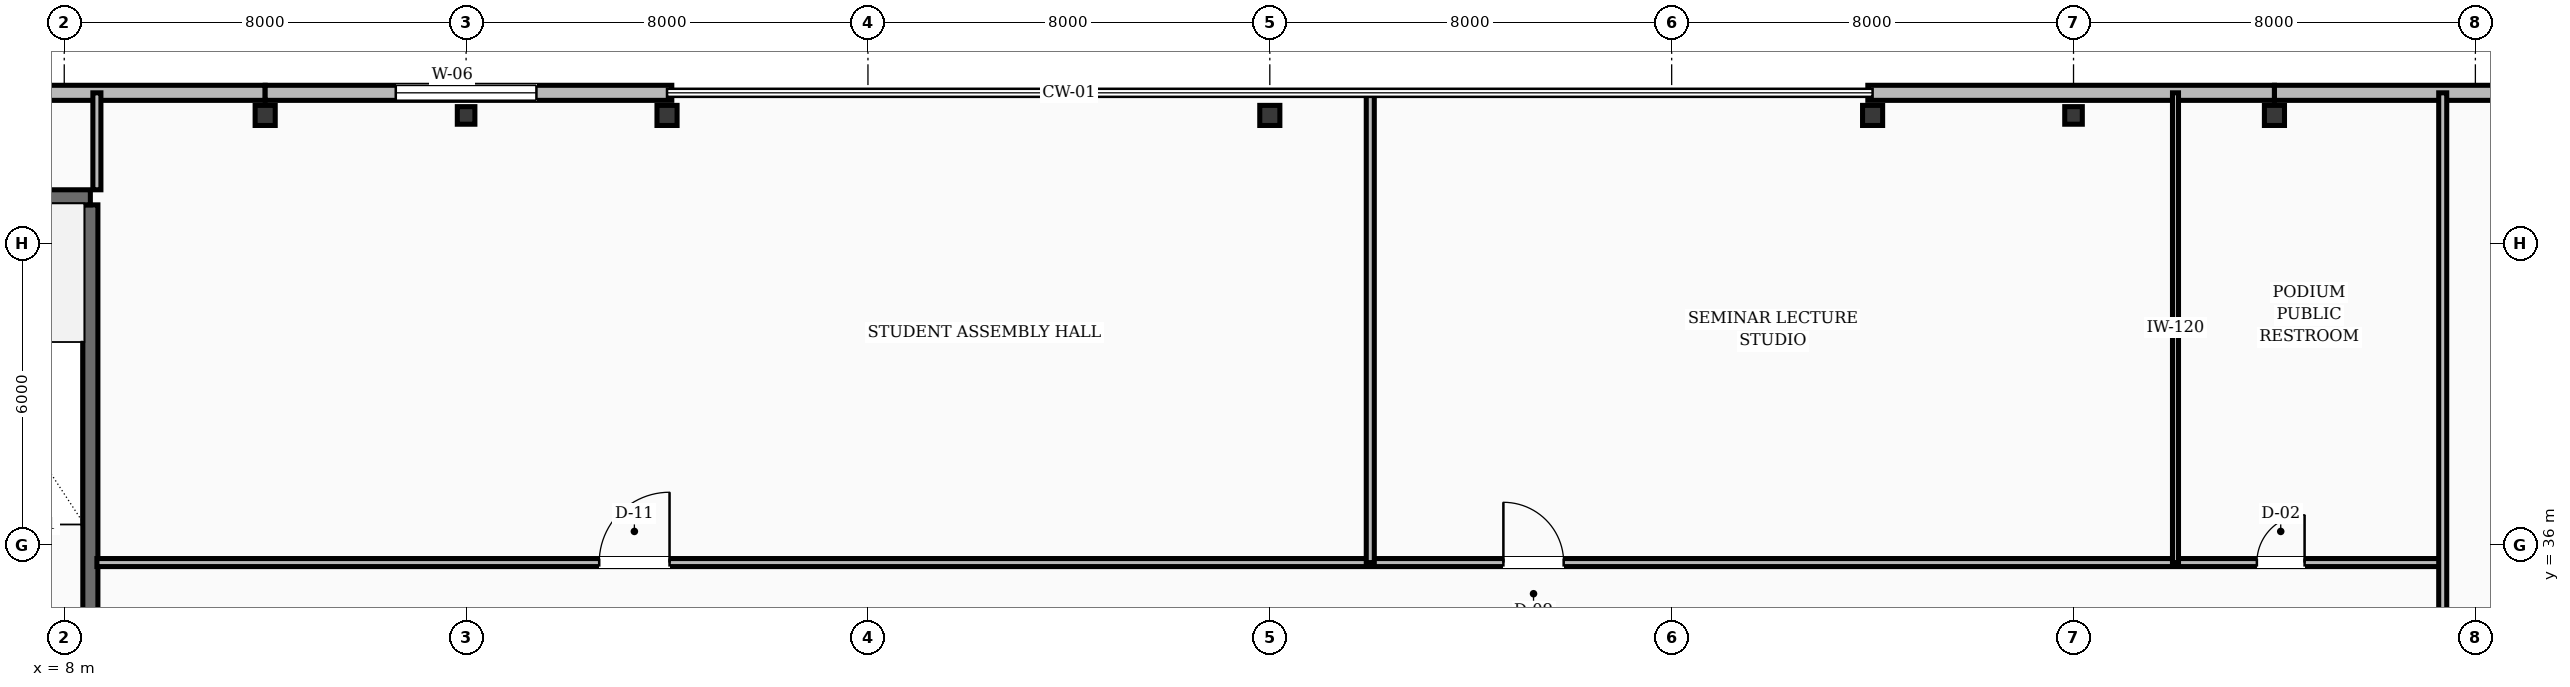
"""IFC4 building model, lengths in metres.
Left out: names, types, materials, properties, quantities, classifications, styles, units other than length and angle.
Written with IfcOpenShell. Run it as: python <this file> out.ifc"""

import sys

from ifc_helpers import new_model, si_unit, direction, frame, frame_2d, origin, origin_2d, place, context, subcontext, project, spatial, rectangle, hollow_rectangle, i_section, extrude, element, fill, save


model = new_model("IFC4")
c1 = context("Model", 3, precision=1e-05, world=origin(), true_north=direction((0.0, 1.0)))
c2 = subcontext(c1, "Body", "Model", "MODEL_VIEW")
j1 = project(units=[si_unit("LENGTHUNIT", "METRE"), si_unit("PLANEANGLEUNIT", "RADIAN")], contexts=[c1])
p1 = place(None, origin())
s1 = spatial("IfcSite", under=j1, at=p1, CompositionType="ELEMENT")
p2 = place(p1, origin())
s2 = spatial("IfcBuilding", under=s1, at=p2, CompositionType="ELEMENT")
p3 = place(p2, frame((0.0, 0.0, 5.2)))
s3 = spatial("IfcBuildingStorey", under=s2, at=p3, CompositionType="ELEMENT", Elevation=5.2)
p4 = place(p3, frame((8.52, 34.43, 0.0), z_axis=(0.0, 0.0, 1.0), x_axis=(0.0, 1.0, 0.0)))
e1 = element("IfcWall", 1, at=p4, inside=s3, PredefinedType="SHEAR", context=c2, shape_type="SweptSolid", body=[
    extrude(rectangle(XDim=8.34, YDim=0.3, at=frame_2d((4.17, 0.0))), origin(), (0.0, 0.0, 1.0), 4.8),
])
p5 = place(p3, frame((4.08, 42.92, 0.0), z_axis=(0.0, 0.0, 1.0), x_axis=(1.0, 0.0, 0.0)))
e2 = element("IfcWall", 2, at=p5, inside=s3, PredefinedType="SHEAR", context=c2, shape_type="SweptSolid", body=[
    extrude(rectangle(XDim=4.44, YDim=0.3, at=frame_2d((2.22, 0.0))), origin(), (0.0, 0.0, 1.0), 4.8),
])
for number, where, z_axis, x_axis in (
    (3, (12.0, 44.55, 0.0), (0.0, 0.0, 1.0), (1.0, 0.0, 0.0)),
    (4, (20.0, 44.55, 0.0), (0.0, 0.0, 1.0), (1.0, 0.0, 0.0)),
    (5, (32.0, 44.55, 0.0), (0.0, 0.0, 1.0), (1.0, 0.0, 0.0)),
    (6, (44.0, 44.55, 0.0), (0.0, 0.0, 1.0), (1.0, 0.0, 0.0)),
    (7, (52.0, 44.55, 0.0), (0.0, 0.0, 1.0), (1.0, 0.0, 0.0)),
):
    element("IfcColumn", number, at=place(p3, frame(where, z_axis=z_axis, x_axis=x_axis)), inside=s3, PredefinedType="COLUMN", context=c2, shape_type="SweptSolid", body=[
        extrude(i_section(OverallWidth=0.4, OverallDepth=0.4, WebThickness=0.013, FlangeThickness=0.021, FilletRadius=0.018, at=origin_2d()), origin(), (0.0, 0.0, 1.0), 4.8),
    ])
for number, where, z_axis, x_axis in (
    (8, (16.0, 44.55, 0.0), (0.0, 0.0, 1.0), (1.0, 0.0, 0.0)),
    (9, (48.0, 44.55, 0.0), (0.0, 0.0, 1.0), (1.0, 0.0, 0.0)),
):
    element("IfcColumn", number, at=place(p3, frame(where, z_axis=z_axis, x_axis=x_axis)), inside=s3, PredefinedType="PILASTER", context=c2, shape_type="SweptSolid", body=[
        extrude(hollow_rectangle(XDim=0.35, YDim=0.35, WallThickness=0.016, at=origin_2d()), origin(), (0.0, 0.0, 1.0), 4.8),
    ])
p6 = place(p3, frame((12.0, 45.0, 0.0), z_axis=(0.0, 0.0, 1.0), x_axis=(-1.0, 0.0, 0.0)))
e10 = element("IfcWall", 10, at=p6, inside=s3, PredefinedType="STANDARD", context=c2, shape_type="SweptSolid", body=[
    extrude(rectangle(XDim=8.0, YDim=0.3, at=frame_2d((4.0, 0.0))), origin(), (0.0, 0.0, 1.0), 3.57),
])
p7 = place(p3, frame((20.095, 45.0, 0.0), z_axis=(0.0, 0.0, 1.0), x_axis=(-1.0, 0.0, 0.0)))
e11 = element("IfcWall", 11, at=p7, inside=s3, PredefinedType="STANDARD", context=c2, shape_type="SweptSolid", body=[
    extrude(rectangle(XDim=8.095, YDim=0.3, at=frame_2d((4.047, 0.0))), origin(), (0.0, 0.0, 1.0), 3.57),
])
p8 = place(p7, frame((2.695, 0.0, 0.85)))
e12 = element("IfcOpeningElement", 12, at=p8, cuts=e11, PredefinedType="OPENING", context=c2, shape_type="SweptSolid", body=[
    extrude(rectangle(XDim=2.8, YDim=2.3, at=frame_2d((1.4, 1.15))), frame((0.0, 0.16, 0.0), z_axis=(0.0, -1.0, 0.0), x_axis=(1.0, 0.0, 0.0)), (0.0, 0.0, 1.0), 0.32),
])
p9 = place(p3, frame((52.0, 45.0, 0.0), z_axis=(0.0, 0.0, 1.0), x_axis=(-1.0, 0.0, 0.0)))
e13 = element("IfcWall", 13, at=p9, inside=s3, PredefinedType="STANDARD", context=c2, shape_type="SweptSolid", body=[
    extrude(rectangle(XDim=8.095, YDim=0.3, at=frame_2d((4.047, 0.0))), origin(), (0.0, 0.0, 1.0), 3.57),
])
p10 = place(p3, frame((60.0, 45.0, 0.0), z_axis=(0.0, 0.0, 1.0), x_axis=(-1.0, 0.0, 0.0)))
e14 = element("IfcWall", 14, at=p10, inside=s3, PredefinedType="STANDARD", context=c2, shape_type="SweptSolid", body=[
    extrude(rectangle(XDim=8.0, YDim=0.3, at=frame_2d((4.0, 0.0))), origin(), (0.0, 0.0, 1.0), 3.57),
])
p11 = place(p3, frame((8.65, 35.65, 0.0), z_axis=(0.0, 0.0, 1.0), x_axis=(1.0, 0.0, 0.0)))
e15 = element("IfcWall", 15, at=p11, inside=s3, PredefinedType="SOLIDWALL", context=c2, shape_type="SweptSolid", body=[
    extrude(rectangle(XDim=46.7, YDim=0.16, at=frame_2d((23.35, 0.0))), origin(), (0.0, 0.0, 1.0), 3.52),
])
p12 = place(p11, frame((10.0, 0.0, 0.0)))
e16 = element("IfcOpeningElement", 16, at=p12, cuts=e15, PredefinedType="OPENING", context=c2, shape_type="SweptSolid", body=[
    extrude(rectangle(XDim=1.4, YDim=2.15, at=frame_2d((0.7, 1.075))), frame((0.0, 0.09, 0.0), z_axis=(0.0, -1.0, 0.0), x_axis=(1.0, 0.0, 0.0)), (0.0, 0.0, 1.0), 0.18),
])
p13 = place(p11, frame((28.0, 0.0, 0.0)))
e17 = element("IfcOpeningElement", 17, at=p13, cuts=e15, PredefinedType="OPENING", context=c2, shape_type="SweptSolid", body=[
    extrude(rectangle(XDim=1.2, YDim=2.1, at=frame_2d((0.6, 1.05))), frame((0.0, 0.09, 0.0), z_axis=(0.0, -1.0, 0.0), x_axis=(1.0, 0.0, 0.0)), (0.0, 0.0, 1.0), 0.18),
])
p14 = place(p11, frame((43.0, 0.0, 0.0)))
e18 = element("IfcOpeningElement", 18, at=p14, cuts=e15, PredefinedType="OPENING", context=c2, shape_type="SweptSolid", body=[
    extrude(rectangle(XDim=0.95, YDim=2.1, at=frame_2d((0.475, 1.05))), frame((0.0, 0.09, 0.0), z_axis=(0.0, -1.0, 0.0), x_axis=(1.0, 0.0, 0.0)), (0.0, 0.0, 1.0), 0.18),
])
p15 = place(p3, frame((55.35, 15.55, 0.0), z_axis=(0.0, 0.0, 1.0), x_axis=(0.0, 1.0, 0.0)))
e19 = element("IfcWall", 19, at=p15, inside=s3, PredefinedType="SOLIDWALL", context=c2, shape_type="SweptSolid", body=[
    extrude(rectangle(XDim=29.45, YDim=0.16, at=frame_2d((14.725, 0.0))), origin(), (0.0, 0.0, 1.0), 3.52),
])
p16 = place(p15, frame((8.0, 0.0, 0.0)))
e20 = element("IfcOpeningElement", 20, at=p16, cuts=e19, PredefinedType="OPENING", context=c2, shape_type="SweptSolid", body=[
    extrude(rectangle(XDim=1.4, YDim=2.15, at=frame_2d((0.7, 1.075))), frame((0.0, 0.09, 0.0), z_axis=(0.0, -1.0, 0.0), x_axis=(1.0, 0.0, 0.0)), (0.0, 0.0, 1.0), 0.18),
])
p17 = place(p3, frame((8.65, 43.07, 0.0), z_axis=(0.0, 0.0, 1.0), x_axis=(0.0, 1.0, 0.0)))
e21 = element("IfcWall", 21, at=p17, inside=s3, PredefinedType="SOLIDWALL", context=c2, shape_type="SweptSolid", body=[
    extrude(rectangle(XDim=1.93, YDim=0.16, at=frame_2d((0.965, 0.0))), origin(), (0.0, 0.0, 1.0), 3.52),
])
p18 = place(p3, frame((34.0, 35.65, 0.0), z_axis=(0.0, 0.0, 1.0), x_axis=(0.0, 1.0, 0.0)))
e22 = element("IfcWall", 22, at=p18, inside=s3, PredefinedType="SOLIDWALL", context=c2, shape_type="SweptSolid", body=[
    extrude(rectangle(XDim=9.35, YDim=0.16, at=frame_2d((4.675, 0.0))), origin(), (0.0, 0.0, 1.0), 3.52),
])
p19 = place(p3, frame((50.03, 35.65, 0.0), z_axis=(0.0, 0.0, 1.0), x_axis=(0.0, 1.0, 0.0)))
e23 = element("IfcWall", 23, at=p19, inside=s3, PredefinedType="PARTITIONING", context=c2, shape_type="SweptSolid", body=[
    extrude(rectangle(XDim=9.35, YDim=0.12, at=frame_2d((4.675, 0.0))), origin(), (0.0, 0.0, 1.0), 3.52),
])
p20 = place(p8, origin())
e24 = element("IfcWindow", 24, at=p20, inside=s3, PartitioningType="SINGLE_PANEL", PredefinedType="WINDOW", context=c2, shape_type="SweptSolid", body=[
    extrude(rectangle(XDim=2.8, YDim=2.3, at=frame_2d((1.4, 1.15))), frame((0.0, 0.03, 0.0), z_axis=(0.0, -1.0, 0.0), x_axis=(1.0, 0.0, 0.0)), (0.0, 0.0, 1.0), 0.06),
])
fill(e12, e24)
p21 = place(p12, origin())
e25 = element("IfcDoor", 25, at=p21, inside=s3, OperationType="SINGLE_SWING_RIGHT", PredefinedType="DOOR", context=c2, shape_type="SweptSolid", body=[
    extrude(rectangle(XDim=1.4, YDim=2.15, at=frame_2d((0.7, 1.075))), frame((0.0, 0.025, 0.0), z_axis=(0.0, -1.0, 0.0), x_axis=(1.0, 0.0, 0.0)), (0.0, 0.0, 1.0), 0.05),
])
fill(e16, e25)
p22 = place(p13, origin())
e26 = element("IfcDoor", 26, at=p22, inside=s3, OperationType="SINGLE_SWING_LEFT", PredefinedType="DOOR", context=c2, shape_type="SweptSolid", body=[
    extrude(rectangle(XDim=1.2, YDim=2.1, at=frame_2d((0.6, 1.05))), frame((0.0, 0.025, 0.0), z_axis=(0.0, -1.0, 0.0), x_axis=(1.0, 0.0, 0.0)), (0.0, 0.0, 1.0), 0.05),
])
fill(e17, e26)
p23 = place(p14, origin())
e27 = element("IfcDoor", 27, at=p23, inside=s3, OperationType="SINGLE_SWING_RIGHT", PredefinedType="DOOR", context=c2, shape_type="SweptSolid", body=[
    extrude(rectangle(XDim=0.95, YDim=2.1, at=frame_2d((0.475, 1.05))), frame((0.0, 0.025, 0.0), z_axis=(0.0, -1.0, 0.0), x_axis=(1.0, 0.0, 0.0)), (0.0, 0.0, 1.0), 0.05),
])
fill(e18, e27)
save(model, sys.argv[1])
